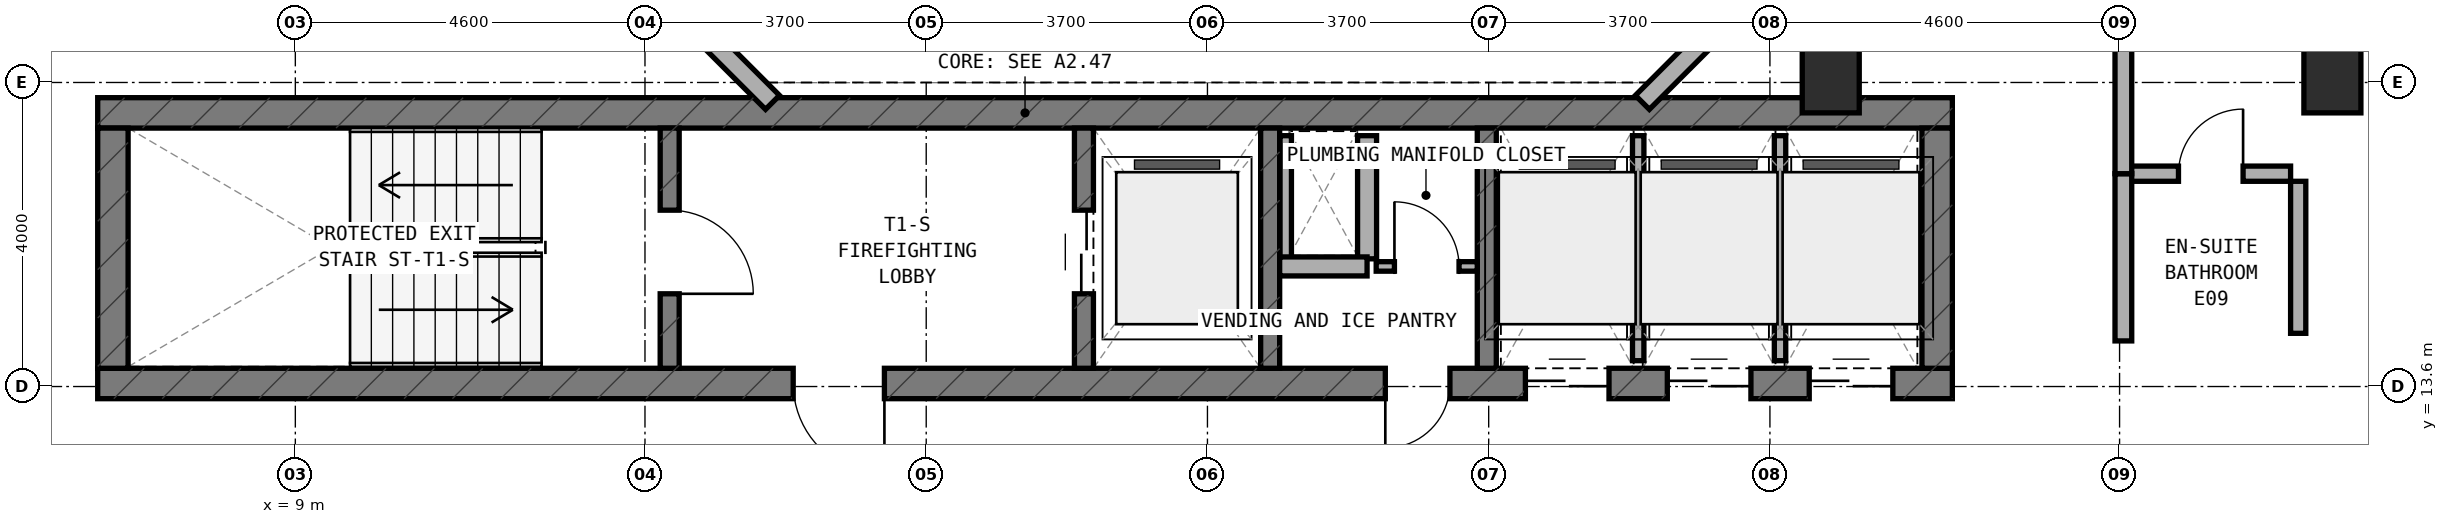
"""IFC4 building model, lengths in metres.
Left out: names, types, materials, properties, quantities, classifications, styles, units other than length and angle.
Written with IfcOpenShell. Run it as: python <this file> out.ifc"""

import sys

from ifc_helpers import new_model, si_unit, direction, frame, frame_2d, origin, origin_2d, place, context, subcontext, project, spatial, rectangle, extrude, element, fill, save


model = new_model("IFC4")
c1 = context("Model", 3, precision=1e-05, world=origin(), true_north=direction((0.0, 1.0)))
c2 = subcontext(c1, "Body", "Model", "MODEL_VIEW")
j1 = project(units=[si_unit("LENGTHUNIT", "METRE"), si_unit("PLANEANGLEUNIT", "RADIAN")], contexts=[c1])
p1 = place(None, origin())
s1 = spatial("IfcSite", under=j1, at=p1, CompositionType="ELEMENT")
p2 = place(p1, origin())
s2 = spatial("IfcBuilding", under=s1, at=p2, CompositionType="ELEMENT")
p3 = place(p2, frame((0.0, 0.0, 220.7)))
s3 = spatial("IfcBuildingStorey", under=s2, at=p3, CompositionType="ELEMENT", Elevation=220.7)
p4 = place(p3, frame((6.4, 13.64, 0.0), z_axis=(0.0, 0.0, 1.0), x_axis=(1.0, 0.0, 0.0)))
e1 = element("IfcWall", 1, at=p4, inside=s3, PredefinedType="SHEAR", context=c2, shape_type="SweptSolid", body=[
    extrude(rectangle(XDim=24.4, YDim=0.4, at=frame_2d((12.2, 0.0))), origin(), (0.0, 0.0, 1.0), 3.6),
])
p5 = place(p4, frame((9.15, 0.0, 0.0)))
e2 = element("IfcOpeningElement", 2, at=p5, cuts=e1, PredefinedType="OPENING", context=c2, shape_type="SweptSolid", body=[
    extrude(rectangle(XDim=1.2, YDim=2.15, at=frame_2d((0.6, 1.075))), frame((0.0, 0.21, 0.0), z_axis=(0.0, -1.0, 0.0), x_axis=(1.0, 0.0, 0.0)), (0.0, 0.0, 1.0), 0.42),
])
p6 = place(p4, frame((16.94, 0.0, 0.0)))
e3 = element("IfcOpeningElement", 3, at=p6, cuts=e1, PredefinedType="OPENING", context=c2, shape_type="SweptSolid", body=[
    extrude(rectangle(XDim=0.85, YDim=2.1, at=frame_2d((0.425, 1.05))), frame((0.0, 0.21, 0.0), z_axis=(0.0, -1.0, 0.0), x_axis=(1.0, 0.0, 0.0)), (0.0, 0.0, 1.0), 0.42),
])
p7 = place(p4, frame((18.783, 0.0, 0.0)))
e4 = element("IfcOpeningElement", 4, at=p7, cuts=e1, PredefinedType="OPENING", context=c2, shape_type="SweptSolid", body=[
    extrude(rectangle(XDim=1.1, YDim=2.15, at=frame_2d((0.55, 1.075))), frame((0.0, 0.21, 0.0), z_axis=(0.0, -1.0, 0.0), x_axis=(1.0, 0.0, 0.0)), (0.0, 0.0, 1.0), 0.42),
])
p8 = place(p4, frame((20.65, 0.0, 0.0)))
e5 = element("IfcOpeningElement", 5, at=p8, cuts=e1, PredefinedType="OPENING", context=c2, shape_type="SweptSolid", body=[
    extrude(rectangle(XDim=1.1, YDim=2.15, at=frame_2d((0.55, 1.075))), frame((0.0, 0.21, 0.0), z_axis=(0.0, -1.0, 0.0), x_axis=(1.0, 0.0, 0.0)), (0.0, 0.0, 1.0), 0.42),
])
p9 = place(p4, frame((22.517, 0.0, 0.0)))
e6 = element("IfcOpeningElement", 6, at=p9, cuts=e1, PredefinedType="OPENING", context=c2, shape_type="SweptSolid", body=[
    extrude(rectangle(XDim=1.1, YDim=2.15, at=frame_2d((0.55, 1.075))), frame((0.0, 0.21, 0.0), z_axis=(0.0, -1.0, 0.0), x_axis=(1.0, 0.0, 0.0)), (0.0, 0.0, 1.0), 0.42),
])
p10 = place(p3, frame((6.4, 17.2, 0.0), z_axis=(0.0, 0.0, 1.0), x_axis=(1.0, 0.0, 0.0)))
e7 = element("IfcWall", 7, at=p10, inside=s3, PredefinedType="SHEAR", context=c2, shape_type="SweptSolid", body=[
    extrude(rectangle(XDim=24.4, YDim=0.4, at=frame_2d((12.2, 0.0))), origin(), (0.0, 0.0, 1.0), 3.6),
])
for number, where, z_axis, x_axis in (
    (8, (6.6, 13.84, 0.0), (0.0, 0.0, 1.0), (0.0, 1.0, 0.0)),
    (9, (30.6, 13.84, 0.0), (0.0, 0.0, 1.0), (0.0, 1.0, 0.0)),
):
    element("IfcWall", number, at=place(p3, frame(where, z_axis=z_axis, x_axis=x_axis)), inside=s3, PredefinedType="SHEAR", context=c2, shape_type="SweptSolid", body=[
        extrude(rectangle(XDim=3.16, YDim=0.4, at=frame_2d((1.58, 0.0))), origin(), (0.0, 0.0, 1.0), 3.6),
    ])
p11 = place(p3, frame((13.925, 13.84, 0.0), z_axis=(0.0, 0.0, 1.0), x_axis=(0.0, 1.0, 0.0)))
e10 = element("IfcWall", 10, at=p11, inside=s3, PredefinedType="STANDARD", context=c2, shape_type="SweptSolid", body=[
    extrude(rectangle(XDim=3.16, YDim=0.25, at=frame_2d((1.58, 0.0))), origin(), (0.0, 0.0, 1.0), 3.32),
])
p12 = place(p11, frame((0.98, 0.0, 0.0)))
e11 = element("IfcOpeningElement", 11, at=p12, cuts=e10, PredefinedType="OPENING", context=c2, shape_type="SweptSolid", body=[
    extrude(rectangle(XDim=1.1, YDim=2.15, at=frame_2d((0.55, 1.075))), frame((0.0, 0.135, 0.0), z_axis=(0.0, -1.0, 0.0), x_axis=(1.0, 0.0, 0.0)), (0.0, 0.0, 1.0), 0.27),
])
p13 = place(p3, frame((19.375, 13.84, 0.0), z_axis=(0.0, 0.0, 1.0), x_axis=(0.0, 1.0, 0.0)))
e12 = element("IfcWall", 12, at=p13, inside=s3, PredefinedType="STANDARD", context=c2, shape_type="SweptSolid", body=[
    extrude(rectangle(XDim=3.16, YDim=0.25, at=frame_2d((1.58, 0.0))), origin(), (0.0, 0.0, 1.0), 3.32),
])
p14 = place(p13, frame((0.98, 0.0, 0.0)))
e13 = element("IfcOpeningElement", 13, at=p14, cuts=e12, PredefinedType="OPENING", context=c2, shape_type="SweptSolid", body=[
    extrude(rectangle(XDim=1.1, YDim=2.15, at=frame_2d((0.55, 1.075))), frame((0.0, 0.135, 0.0), z_axis=(0.0, -1.0, 0.0), x_axis=(1.0, 0.0, 0.0)), (0.0, 0.0, 1.0), 0.27),
])
for number, where, z_axis, x_axis in (
    (14, (21.825, 13.84, 0.0), (0.0, 0.0, 1.0), (0.0, 1.0, 0.0)),
    (15, (24.675, 13.84, 0.0), (0.0, 0.0, 1.0), (0.0, 1.0, 0.0)),
):
    element("IfcWall", number, at=place(p3, frame(where, z_axis=z_axis, x_axis=x_axis)), inside=s3, PredefinedType="STANDARD", context=c2, shape_type="SweptSolid", body=[
        extrude(rectangle(XDim=3.16, YDim=0.25, at=frame_2d((1.58, 0.0))), origin(), (0.0, 0.0, 1.0), 3.32),
    ])
for number, where, z_axis, x_axis in (
    (16, (35.8, 17.65, 0.0), (0.0, 0.0, 1.0), (1.0, 0.0, 0.0)),
    (17, (29.2, 17.65, 0.0), (0.0, 0.0, 1.0), (1.0, 0.0, 0.0)),
):
    element("IfcColumn", number, at=place(p3, frame(where, z_axis=z_axis, x_axis=x_axis)), inside=s3, PredefinedType="COLUMN", context=c2, shape_type="SweptSolid", body=[
        extrude(rectangle(XDim=0.75, YDim=0.9, at=origin_2d()), origin(), (0.0, 0.0, 1.0), 3.6),
    ])
for number, where, z_axis, x_axis in (
    (18, (26.722, 17.338, 0.0), (0.0, 0.0, 1.0), (0.707, 0.707, 0.0)),
    (19, (13.444, 19.172, 0.0), (0.0, 0.0, 1.0), (0.707, -0.707, 0.0)),
):
    element("IfcWall", number, at=place(p3, frame(where, z_axis=z_axis, x_axis=x_axis)), inside=s3, PredefinedType="STANDARD", context=c2, shape_type="SweptSolid", body=[
        extrude(rectangle(XDim=2.594, YDim=0.26, at=frame_2d((1.297, 0.0))), origin(), (0.0, 0.0, 1.0), 3.32),
    ])
p15 = place(p3, frame((22.03, 15.28, 0.0), z_axis=(0.0, 0.0, 1.0), x_axis=(0.0, 1.0, 0.0)))
e20 = element("IfcWall", 20, at=p15, inside=s3, PredefinedType="PARTITIONING", context=c2, shape_type="SweptSolid", body=[
    extrude(rectangle(XDim=1.62, YDim=0.15, at=frame_2d((0.81, 0.0))), origin(), (0.0, 0.0, 1.0), 3.32),
])
p16 = place(p3, frame((23.1, 15.28, 0.0), z_axis=(0.0, 0.0, 1.0), x_axis=(0.0, 1.0, 0.0)))
e21 = element("IfcWall", 21, at=p16, inside=s3, PredefinedType="SOLIDWALL", context=c2, shape_type="SweptSolid", body=[
    extrude(rectangle(XDim=1.62, YDim=0.25, at=frame_2d((0.81, 0.0))), origin(), (0.0, 0.0, 1.0), 3.32),
])
p17 = place(p3, frame((21.95, 15.18, 0.0), z_axis=(0.0, 0.0, 1.0), x_axis=(1.0, 0.0, 0.0)))
e22 = element("IfcWall", 22, at=p17, inside=s3, PredefinedType="SOLIDWALL", context=c2, shape_type="SweptSolid", body=[
    extrude(rectangle(XDim=1.15, YDim=0.25, at=frame_2d((0.575, 0.0))), origin(), (0.0, 0.0, 1.0), 3.32),
])
p18 = place(p3, frame((23.22, 15.18, 0.0), z_axis=(0.0, 0.0, 1.0), x_axis=(1.0, 0.0, 0.0)))
e23 = element("IfcWall", 23, at=p18, inside=s3, PredefinedType="PARTITIONING", context=c2, shape_type="SweptSolid", body=[
    extrude(rectangle(XDim=1.33, YDim=0.125, at=frame_2d((0.665, 0.0))), origin(), (0.0, 0.0, 1.0), 3.32),
])
p19 = place(p18, frame((0.24, 0.0, 0.0)))
e24 = element("IfcOpeningElement", 24, at=p19, cuts=e23, PredefinedType="OPENING", context=c2, shape_type="SweptSolid", body=[
    extrude(rectangle(XDim=0.85, YDim=2.1, at=frame_2d((0.425, 1.05))), frame((0.0, 0.073, 0.0), z_axis=(0.0, -1.0, 0.0), x_axis=(1.0, 0.0, 0.0)), (0.0, 0.0, 1.0), 0.145),
])
p20 = place(p3, frame((26.667, 13.94, 0.0), z_axis=(0.0, 0.0, 1.0), x_axis=(0.0, 1.0, 0.0)))
e25 = element("IfcWall", 25, at=p20, inside=s3, PredefinedType="PARTITIONING", context=c2, shape_type="SweptSolid", body=[
    extrude(rectangle(XDim=2.96, YDim=0.15, at=frame_2d((1.48, 0.0))), origin(), (0.0, 0.0, 1.0), 3.32),
])
p21 = place(p3, frame((28.533, 13.94, 0.0), z_axis=(0.0, 0.0, 1.0), x_axis=(0.0, 1.0, 0.0)))
e26 = element("IfcWall", 26, at=p21, inside=s3, PredefinedType="PARTITIONING", context=c2, shape_type="SweptSolid", body=[
    extrude(rectangle(XDim=2.96, YDim=0.15, at=frame_2d((1.48, 0.0))), origin(), (0.0, 0.0, 1.0), 2.695),
])
p22 = place(p3, frame((33.15, 16.4, 0.0), z_axis=(0.0, 0.0, 1.0), x_axis=(1.0, 0.0, 0.0)))
e27 = element("IfcWall", 27, at=p22, inside=s3, PredefinedType="PLUMBINGWALL", context=c2, shape_type="SweptSolid", body=[
    extrude(rectangle(XDim=2.1, YDim=0.2, at=frame_2d((1.05, 0.0))), origin(), (0.0, 0.0, 1.0), 3.32),
])
p23 = place(p22, frame((0.625, 0.0, 0.0)))
e28 = element("IfcOpeningElement", 28, at=p23, cuts=e27, PredefinedType="OPENING", context=c2, shape_type="SweptSolid", body=[
    extrude(rectangle(XDim=0.85, YDim=2.1, at=frame_2d((0.425, 1.05))), frame((0.0, 0.11, 0.0), z_axis=(0.0, -1.0, 0.0), x_axis=(1.0, 0.0, 0.0)), (0.0, 0.0, 1.0), 0.22),
])
p24 = place(p3, frame((35.35, 14.3, 0.0), z_axis=(0.0, 0.0, 1.0), x_axis=(0.0, 1.0, 0.0)))
e29 = element("IfcWall", 29, at=p24, inside=s3, PredefinedType="PLUMBINGWALL", context=c2, shape_type="SweptSolid", body=[
    extrude(rectangle(XDim=2.0, YDim=0.2, at=frame_2d((1.0, 0.0))), origin(), (0.0, 0.0, 1.0), 3.015),
])
p25 = place(p3, frame((33.05, 14.2, 0.0), z_axis=(0.0, 0.0, 1.0), x_axis=(0.0, 1.0, 0.0)))
e30 = element("IfcWall", 30, at=p25, inside=s3, PredefinedType="SOLIDWALL", context=c2, shape_type="SweptSolid", body=[
    extrude(rectangle(XDim=2.2, YDim=0.22, at=frame_2d((1.1, 0.0))), origin(), (0.0, 0.0, 1.0), 3.32),
])
p26 = place(p3, frame((33.05, 16.4, 0.0), z_axis=(0.0, 0.0, 1.0), x_axis=(0.0, 1.0, 0.0)))
e31 = element("IfcWall", 31, at=p26, inside=s3, PredefinedType="SOLIDWALL", context=c2, shape_type="SweptSolid", body=[
    extrude(rectangle(XDim=6.134, YDim=0.22, at=frame_2d((3.067, 0.0))), origin(), (0.0, 0.0, 1.0), 2.695),
])
p27 = place(p26, frame((2.592, 0.0, 0.0)))
e32 = element("IfcOpeningElement", 32, at=p27, cuts=e31, PredefinedType="OPENING", context=c2, shape_type="SweptSolid", body=[
    extrude(rectangle(XDim=0.95, YDim=2.1, at=frame_2d((0.475, 1.05))), frame((0.0, 0.12, 0.0), z_axis=(0.0, -1.0, 0.0), x_axis=(1.0, 0.0, 0.0)), (0.0, 0.0, 1.0), 0.24),
])
p28 = place(p12, frame((1.1, 0.0, 0.0), z_axis=(0.0, 0.0, 1.0), x_axis=(-1.0, 0.0, 0.0)))
e33 = element("IfcDoor", 33, at=p28, inside=s3, OperationType="SINGLE_SWING_RIGHT", PredefinedType="DOOR", context=c2, shape_type="SweptSolid", body=[
    extrude(rectangle(XDim=1.1, YDim=2.15, at=frame_2d((0.55, 1.075))), frame((0.0, 0.025, 0.0), z_axis=(0.0, -1.0, 0.0), x_axis=(1.0, 0.0, 0.0)), (0.0, 0.0, 1.0), 0.05),
])
fill(e11, e33)
p29 = place(p5, frame((1.2, 0.0, 0.0), z_axis=(0.0, 0.0, 1.0), x_axis=(-1.0, 0.0, 0.0)))
e34 = element("IfcDoor", 34, at=p29, inside=s3, OperationType="SINGLE_SWING_LEFT", PredefinedType="DOOR", context=c2, shape_type="SweptSolid", body=[
    extrude(rectangle(XDim=1.2, YDim=2.15, at=frame_2d((0.6, 1.075))), frame((0.0, 0.025, 0.0), z_axis=(0.0, -1.0, 0.0), x_axis=(1.0, 0.0, 0.0)), (0.0, 0.0, 1.0), 0.05),
])
fill(e2, e34)
p30 = place(p14, origin())
e35 = element("IfcDoor", 35, at=p30, inside=s3, OperationType="DOUBLE_DOOR_SLIDING", PredefinedType="DOOR", context=c2, shape_type="SweptSolid", body=[
    extrude(rectangle(XDim=1.1, YDim=2.15, at=frame_2d((0.55, 1.075))), frame((0.0, 0.025, 0.0), z_axis=(0.0, -1.0, 0.0), x_axis=(1.0, 0.0, 0.0)), (0.0, 0.0, 1.0), 0.05),
])
fill(e13, e35)
p31 = place(p6, frame((0.85, 0.0, 0.0), z_axis=(0.0, 0.0, 1.0), x_axis=(-1.0, 0.0, 0.0)))
e36 = element("IfcDoor", 36, at=p31, inside=s3, OperationType="SINGLE_SWING_RIGHT", PredefinedType="DOOR", context=c2, shape_type="SweptSolid", body=[
    extrude(rectangle(XDim=0.85, YDim=2.1, at=frame_2d((0.425, 1.05))), frame((0.0, 0.025, 0.0), z_axis=(0.0, -1.0, 0.0), x_axis=(1.0, 0.0, 0.0)), (0.0, 0.0, 1.0), 0.05),
])
fill(e3, e36)
p32 = place(p7, frame((1.1, 0.0, 0.0), z_axis=(0.0, 0.0, 1.0), x_axis=(-1.0, 0.0, 0.0)))
e37 = element("IfcDoor", 37, at=p32, inside=s3, OperationType="DOUBLE_DOOR_SLIDING", PredefinedType="DOOR", context=c2, shape_type="SweptSolid", body=[
    extrude(rectangle(XDim=1.1, YDim=2.15, at=frame_2d((0.55, 1.075))), frame((0.0, 0.025, 0.0), z_axis=(0.0, -1.0, 0.0), x_axis=(1.0, 0.0, 0.0)), (0.0, 0.0, 1.0), 0.05),
])
fill(e4, e37)
p33 = place(p8, frame((1.1, 0.0, 0.0), z_axis=(0.0, 0.0, 1.0), x_axis=(-1.0, 0.0, 0.0)))
e38 = element("IfcDoor", 38, at=p33, inside=s3, OperationType="DOUBLE_DOOR_SLIDING", PredefinedType="DOOR", context=c2, shape_type="SweptSolid", body=[
    extrude(rectangle(XDim=1.1, YDim=2.15, at=frame_2d((0.55, 1.075))), frame((0.0, 0.025, 0.0), z_axis=(0.0, -1.0, 0.0), x_axis=(1.0, 0.0, 0.0)), (0.0, 0.0, 1.0), 0.05),
])
fill(e5, e38)
p34 = place(p9, frame((1.1, 0.0, 0.0), z_axis=(0.0, 0.0, 1.0), x_axis=(-1.0, 0.0, 0.0)))
e39 = element("IfcDoor", 39, at=p34, inside=s3, OperationType="DOUBLE_DOOR_SLIDING", PredefinedType="DOOR", context=c2, shape_type="SweptSolid", body=[
    extrude(rectangle(XDim=1.1, YDim=2.15, at=frame_2d((0.55, 1.075))), frame((0.0, 0.025, 0.0), z_axis=(0.0, -1.0, 0.0), x_axis=(1.0, 0.0, 0.0)), (0.0, 0.0, 1.0), 0.05),
])
fill(e6, e39)
p35 = place(p19, origin())
e40 = element("IfcDoor", 40, at=p35, inside=s3, OperationType="SINGLE_SWING_LEFT", PredefinedType="DOOR", context=c2, shape_type="SweptSolid", body=[
    extrude(rectangle(XDim=0.85, YDim=2.1, at=frame_2d((0.425, 1.05))), frame((0.0, 0.025, 0.0), z_axis=(0.0, -1.0, 0.0), x_axis=(1.0, 0.0, 0.0)), (0.0, 0.0, 1.0), 0.05),
])
fill(e24, e40)
p36 = place(p23, origin())
e41 = element("IfcDoor", 41, at=p36, inside=s3, OperationType="SINGLE_SWING_RIGHT", PredefinedType="DOOR", context=c2, shape_type="SweptSolid", body=[
    extrude(rectangle(XDim=0.85, YDim=2.1, at=frame_2d((0.425, 1.05))), frame((0.0, 0.025, 0.0), z_axis=(0.0, -1.0, 0.0), x_axis=(1.0, 0.0, 0.0)), (0.0, 0.0, 1.0), 0.05),
])
fill(e28, e41)
save(model, sys.argv[1])
